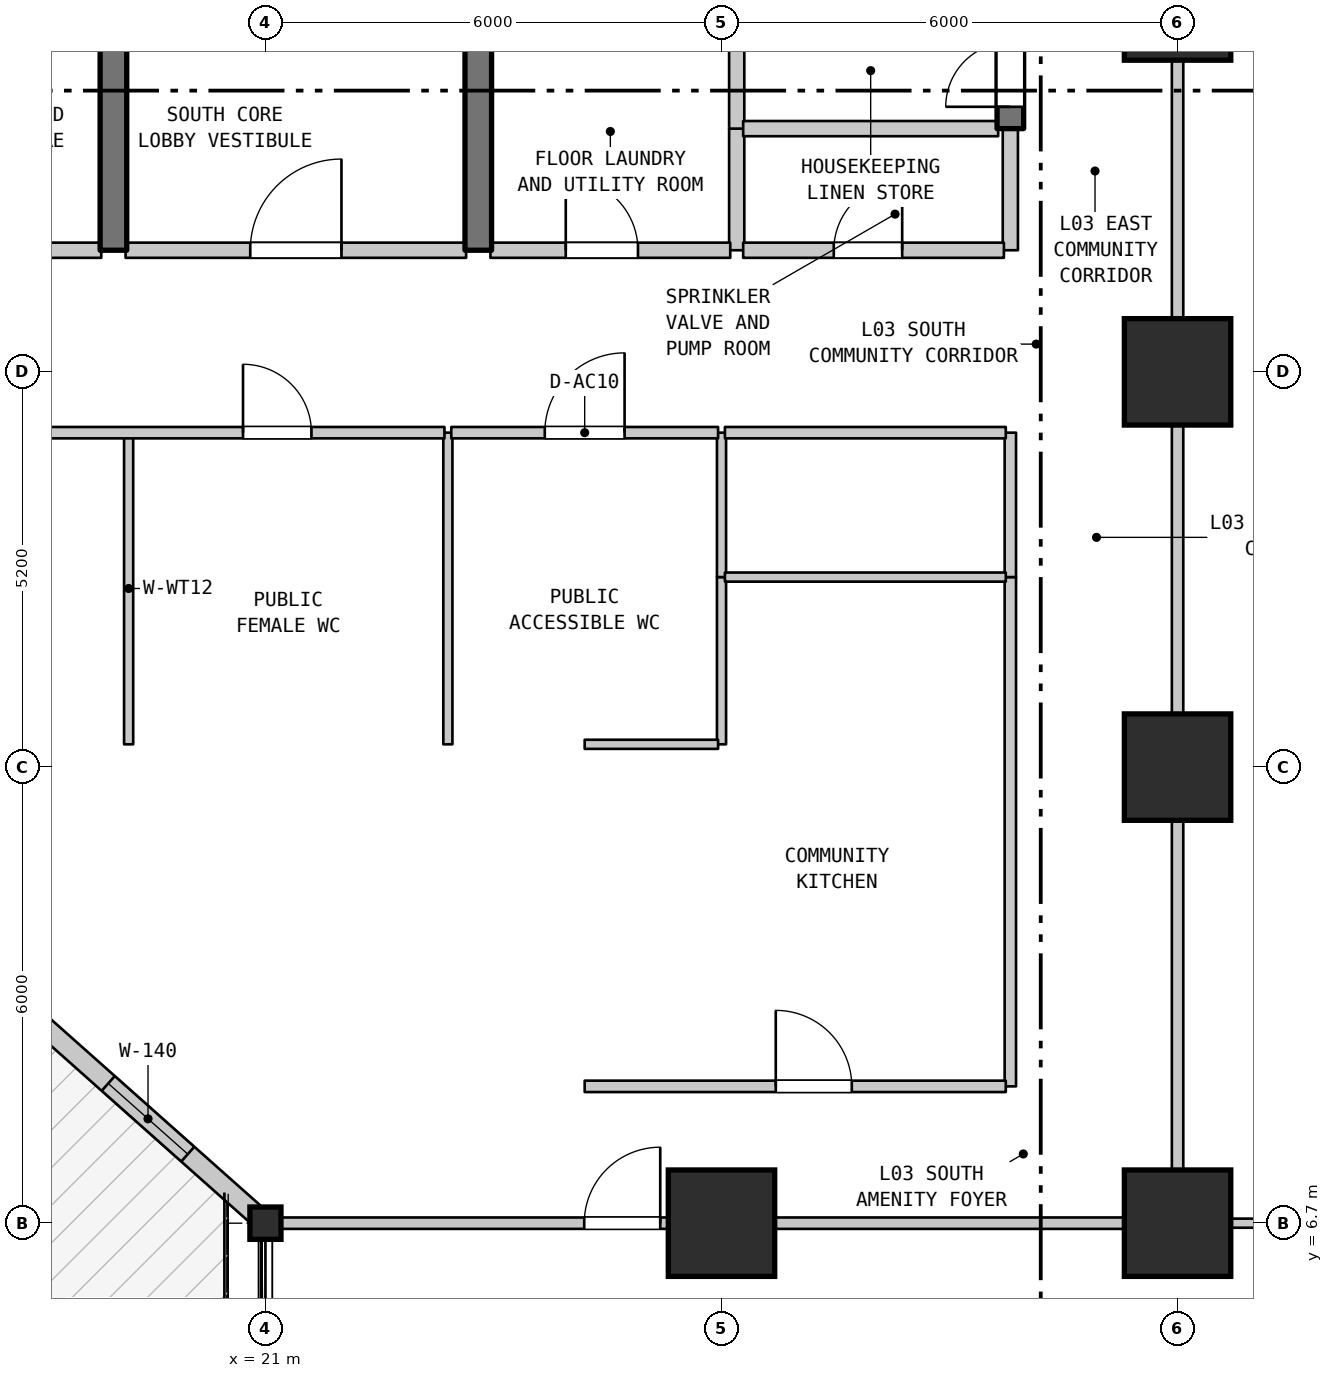
"""IFC4 building model, lengths in metres.
Left out: names, types, materials, properties, quantities, classifications, styles, units other than length and angle.
Written with IfcOpenShell. Run it as: python <this file> out.ifc"""

import sys

from ifc_helpers import new_model, si_unit, direction, frame, frame_2d, origin, origin_2d, place, context, subcontext, project, spatial, rectangle, i_section, extrude, element, fill, save


model = new_model("IFC4")
c1 = context("Model", 3, precision=1e-05, world=origin(), true_north=direction((0.0, 1.0)))
c2 = subcontext(c1, "Body", "Model", "MODEL_VIEW")
j1 = project(units=[si_unit("LENGTHUNIT", "METRE"), si_unit("PLANEANGLEUNIT", "RADIAN")], contexts=[c1])
p1 = place(None, origin())
s1 = spatial("IfcSite", under=j1, at=p1, CompositionType="ELEMENT")
p2 = place(p1, origin())
s2 = spatial("IfcBuilding", under=s1, at=p2, CompositionType="ELEMENT")
p3 = place(p2, frame((0.0, 0.0, 19.0)))
s3 = spatial("IfcBuildingStorey", under=s2, at=p3, CompositionType="ELEMENT", Elevation=19.0)
p4 = place(p3, frame((21.0, 6.7, 0.0), z_axis=(0.0, 0.0, 1.0), x_axis=(1.0, 0.0, 0.0)))
e1 = element("IfcColumn", 1, at=p4, inside=s3, PredefinedType="COLUMN", context=c2, shape_type="SweptSolid", body=[
    extrude(i_section(OverallWidth=0.409, OverallDepth=0.425, WebThickness=0.032, FlangeThickness=0.052, FilletRadius=0.015, at=origin_2d()), origin(), (0.0, 0.0, 1.0), 5.0),
])
for number, where, z_axis, x_axis in (
    (2, (27.0, 6.7, 0.0), (0.0, 0.0, 1.0), (1.0, 0.0, 0.0)),
    (3, (33.0, 6.7, 0.0), (0.0, 0.0, 1.0), (1.0, 0.0, 0.0)),
    (4, (33.0, 12.7, 0.0), (0.0, 0.0, 1.0), (1.0, 0.0, 0.0)),
    (5, (33.0, 17.9, 0.0), (0.0, 0.0, 1.0), (1.0, 0.0, 0.0)),
    (6, (33.0, 22.7, 0.0), (0.0, 0.0, 1.0), (1.0, 0.0, 0.0)),
):
    element("IfcColumn", number, at=place(p3, frame(where, z_axis=z_axis, x_axis=x_axis)), inside=s3, PredefinedType="COLUMN", context=c2, shape_type="SweptSolid", body=[
        extrude(rectangle(XDim=1.4, YDim=1.4, at=origin_2d()), origin(), (0.0, 0.0, 1.0), 5.0),
    ])
p5 = place(p3, frame((21.0, 6.7, 0.0), z_axis=(0.0, 0.0, 1.0), x_axis=(-0.747409318684, 0.66436383883, 0.0)))
e7 = element("IfcWall", 7, at=p5, inside=s3, PredefinedType="STANDARD", context=c2, shape_type="SweptSolid", body=[
    extrude(rectangle(XDim=4.495, YDim=0.26, at=frame_2d((2.248, 0.0))), origin(), (0.0, 0.0, 1.0), 4.285),
])
p6 = place(p5, frame((1.367, 0.0, 0.9)))
e8 = element("IfcOpeningElement", 8, at=p6, cuts=e7, PredefinedType="OPENING", context=c2, shape_type="SweptSolid", body=[
    extrude(rectangle(XDim=1.4, YDim=1.85, at=frame_2d((0.7, 0.925))), frame((0.0, 0.14, 0.0), z_axis=(0.0, -1.0, 0.0), x_axis=(1.0, 0.0, 0.0)), (0.0, 0.0, 1.0), 0.28),
])
p7 = place(p3, frame((19.0, 19.5, 0.0), z_axis=(0.0, 0.0, 1.0), x_axis=(0.0, 1.0, 0.0)))
e9 = element("IfcWall", 9, at=p7, inside=s3, PredefinedType="SHEAR", context=c2, shape_type="SweptSolid", body=[
    extrude(rectangle(XDim=3.2, YDim=0.35, at=frame_2d((1.6, 0.0))), origin(), (0.0, 0.0, 1.0), 4.685),
])
for number, where, z_axis, x_axis in (
    (10, (19.2, 13.0, 0.0), (0.0, 0.0, 1.0), (0.0, 1.0, 0.0)),
    (11, (23.4, 13.0, 0.0), (0.0, 0.0, 1.0), (0.0, 1.0, 0.0)),
):
    element("IfcWall", number, at=place(p3, frame(where, z_axis=z_axis, x_axis=x_axis)), inside=s3, PredefinedType="PARTITIONING", context=c2, shape_type="SweptSolid", body=[
        extrude(rectangle(XDim=4.1, YDim=0.12, at=frame_2d((2.05, 0.0))), origin(), (0.0, 0.0, 1.0), 4.685),
    ])
p8 = place(p3, frame((23.8, 19.5, 0.0), z_axis=(0.0, 0.0, 1.0), x_axis=(0.0, 1.0, 0.0)))
e12 = element("IfcWall", 12, at=p8, inside=s3, PredefinedType="SHEAR", context=c2, shape_type="SweptSolid", body=[
    extrude(rectangle(XDim=3.2, YDim=0.35, at=frame_2d((1.6, 0.0))), origin(), (0.0, 0.0, 1.0), 4.685),
])
p9 = place(p3, frame((27.0, 13.0, 0.0), z_axis=(0.0, 0.0, 1.0), x_axis=(0.0, 1.0, 0.0)))
e13 = element("IfcWall", 13, at=p9, inside=s3, PredefinedType="PARTITIONING", context=c2, shape_type="SweptSolid", body=[
    extrude(rectangle(XDim=2.2, YDim=0.12, at=frame_2d((1.1, 0.0))), origin(), (0.0, 0.0, 1.0), 4.685),
])
p10 = place(p3, frame((27.0, 15.2, 0.0), z_axis=(0.0, 0.0, 1.0), x_axis=(0.0, 1.0, 0.0)))
e14 = element("IfcWall", 14, at=p10, inside=s3, PredefinedType="PARTITIONING", context=c2, shape_type="SweptSolid", body=[
    extrude(rectangle(XDim=1.9, YDim=0.12, at=frame_2d((0.95, 0.0))), origin(), (0.0, 0.0, 1.0), 4.685),
])
p11 = place(p3, frame((27.2, 19.5, 0.0), z_axis=(0.0, 0.0, 1.0), x_axis=(0.0, 1.0, 0.0)))
e15 = element("IfcWall", 15, at=p11, inside=s3, PredefinedType="STANDARD", context=c2, shape_type="SweptSolid", body=[
    extrude(rectangle(XDim=1.6, YDim=0.2, at=frame_2d((0.8, 0.0))), origin(), (0.0, 0.0, 1.0), 4.685),
])
p12 = place(p3, frame((27.2, 21.1, 0.0), z_axis=(0.0, 0.0, 1.0), x_axis=(0.0, 1.0, 0.0)))
e16 = element("IfcWall", 16, at=p12, inside=s3, PredefinedType="STANDARD", context=c2, shape_type="SweptSolid", body=[
    extrude(rectangle(XDim=1.6, YDim=0.2, at=frame_2d((0.8, 0.0))), origin(), (0.0, 0.0, 1.0), 4.685),
])
p13 = place(p3, frame((30.8, 8.5, 0.0), z_axis=(0.0, 0.0, 1.0), x_axis=(0.0, 1.0, 0.0)))
e17 = element("IfcWall", 17, at=p13, inside=s3, PredefinedType="STANDARD", context=c2, shape_type="SweptSolid", body=[
    extrude(rectangle(XDim=6.7, YDim=0.15, at=frame_2d((3.35, 0.0))), origin(), (0.0, 0.0, 1.0), 4.685),
])
p14 = place(p3, frame((30.8, 15.2, 0.0), z_axis=(0.0, 0.0, 1.0), x_axis=(0.0, 1.0, 0.0)))
e18 = element("IfcWall", 18, at=p14, inside=s3, PredefinedType="STANDARD", context=c2, shape_type="SweptSolid", body=[
    extrude(rectangle(XDim=1.9, YDim=0.15, at=frame_2d((0.95, 0.0))), origin(), (0.0, 0.0, 1.0), 4.685),
])
p15 = place(p3, frame((30.8, 19.5, 0.0), z_axis=(0.0, 0.0, 1.0), x_axis=(0.0, 1.0, 0.0)))
e19 = element("IfcWall", 19, at=p15, inside=s3, PredefinedType="STANDARD", context=c2, shape_type="SweptSolid", body=[
    extrude(rectangle(XDim=1.6, YDim=0.2, at=frame_2d((0.8, 0.0))), origin(), (0.0, 0.0, 1.0), 4.685),
])
p16 = place(p3, frame((30.8, 21.1, 0.0), z_axis=(0.0, 0.0, 1.0), x_axis=(0.0, 1.0, 0.0)))
e20 = element("IfcWall", 20, at=p16, inside=s3, PredefinedType="SHEAR", context=c2, shape_type="SweptSolid", body=[
    extrude(rectangle(XDim=1.6, YDim=0.35, at=frame_2d((0.8, 0.0))), origin(), (0.0, 0.0, 1.0), 4.685),
])
p17 = place(p16, frame((0.287, 0.0, 0.0)))
e21 = element("IfcOpeningElement", 21, at=p17, cuts=e20, PredefinedType="OPENING", context=c2, shape_type="SweptSolid", body=[
    extrude(rectangle(XDim=0.85, YDim=2.1, at=frame_2d((0.425, 1.05))), frame((0.0, 0.185, 0.0), z_axis=(0.0, -1.0, 0.0), x_axis=(1.0, 0.0, 0.0)), (0.0, 0.0, 1.0), 0.37),
])
p18 = place(p3, frame((33.0, 6.7, 0.0), z_axis=(0.0, 0.0, 1.0), x_axis=(0.0, 1.0, 0.0)))
e22 = element("IfcWall", 22, at=p18, inside=s3, PredefinedType="STANDARD", context=c2, shape_type="SweptSolid", body=[
    extrude(rectangle(XDim=19.2, YDim=0.15, at=frame_2d((9.6, 0.0))), origin(), (0.0, 0.0, 1.0), 4.185),
])
p19 = place(p3, frame((21.01, 6.7, 0.0), z_axis=(0.0, 0.0, 1.0), x_axis=(1.0, 0.0, 0.0)))
e23 = element("IfcWall", 23, at=p19, inside=s3, PredefinedType="STANDARD", context=c2, shape_type="SweptSolid", body=[
    extrude(rectangle(XDim=11.93, YDim=0.15, at=frame_2d((5.965, 0.0))), origin(), (0.0, 0.0, 1.0), 4.185),
])
p20 = place(p19, frame((4.184, 0.0, 0.0)))
e24 = element("IfcOpeningElement", 24, at=p20, cuts=e23, PredefinedType="OPENING", context=c2, shape_type="SweptSolid", body=[
    extrude(rectangle(XDim=1.0, YDim=2.15, at=frame_2d((0.5, 1.075))), frame((0.0, 0.085, 0.0), z_axis=(0.0, -1.0, 0.0), x_axis=(1.0, 0.0, 0.0)), (0.0, 0.0, 1.0), 0.17),
])
p21 = place(p3, frame((33.06, 6.7, 0.0), z_axis=(0.0, 0.0, 1.0), x_axis=(1.0, 0.0, 0.0)))
e25 = element("IfcWall", 25, at=p21, inside=s3, PredefinedType="PARTITIONING", context=c2, shape_type="SweptSolid", body=[
    extrude(rectangle(XDim=5.94, YDim=0.12, at=frame_2d((2.97, 0.0))), origin(), (0.0, 0.0, 1.0), 4.185),
])
p22 = place(p3, frame((25.2, 8.5, 0.0), z_axis=(0.0, 0.0, 1.0), x_axis=(1.0, 0.0, 0.0)))
e26 = element("IfcWall", 26, at=p22, inside=s3, PredefinedType="STANDARD", context=c2, shape_type="SweptSolid", body=[
    extrude(rectangle(XDim=5.54, YDim=0.15, at=frame_2d((2.77, 0.0))), origin(), (0.0, 0.0, 1.0), 4.685),
])
p23 = place(p22, frame((2.514, 0.0, 0.0)))
e27 = element("IfcOpeningElement", 27, at=p23, cuts=e26, PredefinedType="OPENING", context=c2, shape_type="SweptSolid", body=[
    extrude(rectangle(XDim=1.0, YDim=2.15, at=frame_2d((0.5, 1.075))), frame((0.0, 0.085, 0.0), z_axis=(0.0, -1.0, 0.0), x_axis=(1.0, 0.0, 0.0)), (0.0, 0.0, 1.0), 0.17),
])
p24 = place(p3, frame((25.2, 13.0, 0.0), z_axis=(0.0, 0.0, 1.0), x_axis=(1.0, 0.0, 0.0)))
e28 = element("IfcWall", 28, at=p24, inside=s3, PredefinedType="PARTITIONING", context=c2, shape_type="SweptSolid", body=[
    extrude(rectangle(XDim=1.755, YDim=0.12, at=frame_2d((0.877, 0.0))), origin(), (0.0, 0.0, 1.0), 4.685),
])
p25 = place(p3, frame((27.045, 15.2, 0.0), z_axis=(0.0, 0.0, 1.0), x_axis=(1.0, 0.0, 0.0)))
e29 = element("IfcWall", 29, at=p25, inside=s3, PredefinedType="PARTITIONING", context=c2, shape_type="SweptSolid", body=[
    extrude(rectangle(XDim=3.695, YDim=0.12, at=frame_2d((1.848, 0.0))), origin(), (0.0, 0.0, 1.0), 4.685),
])
p26 = place(p3, frame((15.06, 17.1, 0.0), z_axis=(0.0, 0.0, 1.0), x_axis=(1.0, 0.0, 0.0)))
e30 = element("IfcWall", 30, at=p26, inside=s3, PredefinedType="STANDARD", context=c2, shape_type="SweptSolid", body=[
    extrude(rectangle(XDim=8.295, YDim=0.15, at=frame_2d((4.147, 0.0))), origin(), (0.0, 0.0, 1.0), 4.685),
])
p27 = place(p26, frame((1.595, 0.0, 0.0)))
e31 = element("IfcOpeningElement", 31, at=p27, cuts=e30, PredefinedType="OPENING", context=c2, shape_type="SweptSolid", body=[
    extrude(rectangle(XDim=0.9, YDim=2.1, at=frame_2d((0.45, 1.05))), frame((0.0, 0.085, 0.0), z_axis=(0.0, -1.0, 0.0), x_axis=(1.0, 0.0, 0.0)), (0.0, 0.0, 1.0), 0.17),
])
p28 = place(p26, frame((5.645, 0.0, 0.0)))
e32 = element("IfcOpeningElement", 32, at=p28, cuts=e30, PredefinedType="OPENING", context=c2, shape_type="SweptSolid", body=[
    extrude(rectangle(XDim=0.9, YDim=2.1, at=frame_2d((0.45, 1.05))), frame((0.0, 0.085, 0.0), z_axis=(0.0, -1.0, 0.0), x_axis=(1.0, 0.0, 0.0)), (0.0, 0.0, 1.0), 0.17),
])
p29 = place(p3, frame((23.445, 17.1, 0.0), z_axis=(0.0, 0.0, 1.0), x_axis=(1.0, 0.0, 0.0)))
e33 = element("IfcWall", 33, at=p29, inside=s3, PredefinedType="STANDARD", context=c2, shape_type="SweptSolid", body=[
    extrude(rectangle(XDim=3.51, YDim=0.15, at=frame_2d((1.755, 0.0))), origin(), (0.0, 0.0, 1.0), 4.685),
])
p30 = place(p29, frame((1.23, 0.0, 0.0)))
e34 = element("IfcOpeningElement", 34, at=p30, cuts=e33, PredefinedType="OPENING", context=c2, shape_type="SweptSolid", body=[
    extrude(rectangle(XDim=1.05, YDim=2.15, at=frame_2d((0.525, 1.075))), frame((0.0, 0.085, 0.0), z_axis=(0.0, -1.0, 0.0), x_axis=(1.0, 0.0, 0.0)), (0.0, 0.0, 1.0), 0.17),
])
p31 = place(p3, frame((27.045, 17.1, 0.0), z_axis=(0.0, 0.0, 1.0), x_axis=(1.0, 0.0, 0.0)))
e35 = element("IfcWall", 35, at=p31, inside=s3, PredefinedType="STANDARD", context=c2, shape_type="SweptSolid", body=[
    extrude(rectangle(XDim=3.695, YDim=0.15, at=frame_2d((1.848, 0.0))), origin(), (0.0, 0.0, 1.0), 4.685),
])
p32 = place(p3, frame((15.16, 19.5, 0.0), z_axis=(0.0, 0.0, 1.0), x_axis=(1.0, 0.0, 0.0)))
e36 = element("IfcWall", 36, at=p32, inside=s3, PredefinedType="STANDARD", context=c2, shape_type="SweptSolid", body=[
    extrude(rectangle(XDim=3.68, YDim=0.2, at=frame_2d((1.84, 0.0))), origin(), (0.0, 0.0, 1.0), 4.685),
])
p33 = place(p32, frame((1.39, 0.0, 0.0)))
e37 = element("IfcOpeningElement", 37, at=p33, cuts=e36, PredefinedType="OPENING", context=c2, shape_type="SweptSolid", body=[
    extrude(rectangle(XDim=0.9, YDim=2.15, at=frame_2d((0.45, 1.075))), frame((0.0, 0.11, 0.0), z_axis=(0.0, -1.0, 0.0), x_axis=(1.0, 0.0, 0.0)), (0.0, 0.0, 1.0), 0.22),
])
p34 = place(p3, frame((19.16, 19.5, 0.0), z_axis=(0.0, 0.0, 1.0), x_axis=(1.0, 0.0, 0.0)))
e38 = element("IfcWall", 38, at=p34, inside=s3, PredefinedType="STANDARD", context=c2, shape_type="SweptSolid", body=[
    extrude(rectangle(XDim=4.48, YDim=0.2, at=frame_2d((2.24, 0.0))), origin(), (0.0, 0.0, 1.0), 4.685),
])
p35 = place(p34, frame((1.64, 0.0, 0.0)))
e39 = element("IfcOpeningElement", 39, at=p35, cuts=e38, PredefinedType="OPENING", context=c2, shape_type="SweptSolid", body=[
    extrude(rectangle(XDim=1.2, YDim=2.2, at=frame_2d((0.6, 1.1))), frame((0.0, 0.11, 0.0), z_axis=(0.0, -1.0, 0.0), x_axis=(1.0, 0.0, 0.0)), (0.0, 0.0, 1.0), 0.22),
])
p36 = place(p3, frame((23.96, 19.5, 0.0), z_axis=(0.0, 0.0, 1.0), x_axis=(1.0, 0.0, 0.0)))
e40 = element("IfcWall", 40, at=p36, inside=s3, PredefinedType="STANDARD", context=c2, shape_type="SweptSolid", body=[
    extrude(rectangle(XDim=3.155, YDim=0.2, at=frame_2d((1.578, 0.0))), origin(), (0.0, 0.0, 1.0), 4.685),
])
p37 = place(p36, frame((0.991, 0.0, 0.0)))
e41 = element("IfcOpeningElement", 41, at=p37, cuts=e40, PredefinedType="OPENING", context=c2, shape_type="SweptSolid", body=[
    extrude(rectangle(XDim=0.95, YDim=2.15, at=frame_2d((0.475, 1.075))), frame((0.0, 0.11, 0.0), z_axis=(0.0, -1.0, 0.0), x_axis=(1.0, 0.0, 0.0)), (0.0, 0.0, 1.0), 0.22),
])
p38 = place(p3, frame((27.285, 19.5, 0.0), z_axis=(0.0, 0.0, 1.0), x_axis=(1.0, 0.0, 0.0)))
e42 = element("IfcWall", 42, at=p38, inside=s3, PredefinedType="STANDARD", context=c2, shape_type="SweptSolid", body=[
    extrude(rectangle(XDim=3.43, YDim=0.2, at=frame_2d((1.715, 0.0))), origin(), (0.0, 0.0, 1.0), 4.685),
])
p39 = place(p38, frame((1.192, 0.0, 0.0)))
e43 = element("IfcOpeningElement", 43, at=p39, cuts=e42, PredefinedType="OPENING", context=c2, shape_type="SweptSolid", body=[
    extrude(rectangle(XDim=0.9, YDim=2.15, at=frame_2d((0.45, 1.075))), frame((0.0, 0.11, 0.0), z_axis=(0.0, -1.0, 0.0), x_axis=(1.0, 0.0, 0.0)), (0.0, 0.0, 1.0), 0.22),
])
p40 = place(p3, frame((27.285, 21.1, 0.0), z_axis=(0.0, 0.0, 1.0), x_axis=(1.0, 0.0, 0.0)))
e44 = element("IfcWall", 44, at=p40, inside=s3, PredefinedType="STANDARD", context=c2, shape_type="SweptSolid", body=[
    extrude(rectangle(XDim=3.355, YDim=0.2, at=frame_2d((1.677, 0.0))), origin(), (0.0, 0.0, 1.0), 4.685),
])
p41 = place(p6, origin())
e45 = element("IfcWindow", 45, at=p41, inside=s3, PartitioningType="SINGLE_PANEL", PredefinedType="WINDOW", context=c2, shape_type="SweptSolid", body=[
    extrude(rectangle(XDim=1.4, YDim=1.85, at=frame_2d((0.7, 0.925))), frame((0.0, 0.03, 0.0), z_axis=(0.0, -1.0, 0.0), x_axis=(1.0, 0.0, 0.0)), (0.0, 0.0, 1.0), 0.06),
])
fill(e8, e45)
p42 = place(p17, origin())
e46 = element("IfcDoor", 46, at=p42, inside=s3, OperationType="SINGLE_SWING_LEFT", PredefinedType="DOOR", context=c2, shape_type="SweptSolid", body=[
    extrude(rectangle(XDim=0.85, YDim=2.1, at=frame_2d((0.425, 1.05))), frame((0.0, 0.025, 0.0), z_axis=(0.0, -1.0, 0.0), x_axis=(1.0, 0.0, 0.0)), (0.0, 0.0, 1.0), 0.05),
])
fill(e21, e46)
p43 = place(p20, origin())
e47 = element("IfcDoor", 47, at=p43, inside=s3, OperationType="SINGLE_SWING_RIGHT", PredefinedType="DOOR", context=c2, shape_type="SweptSolid", body=[
    extrude(rectangle(XDim=1.0, YDim=2.15, at=frame_2d((0.5, 1.075))), frame((0.0, 0.025, 0.0), z_axis=(0.0, -1.0, 0.0), x_axis=(1.0, 0.0, 0.0)), (0.0, 0.0, 1.0), 0.05),
])
fill(e24, e47)
p44 = place(p23, origin())
e48 = element("IfcDoor", 48, at=p44, inside=s3, OperationType="SINGLE_SWING_LEFT", PredefinedType="DOOR", context=c2, shape_type="SweptSolid", body=[
    extrude(rectangle(XDim=1.0, YDim=2.15, at=frame_2d((0.5, 1.075))), frame((0.0, 0.025, 0.0), z_axis=(0.0, -1.0, 0.0), x_axis=(1.0, 0.0, 0.0)), (0.0, 0.0, 1.0), 0.05),
])
fill(e27, e48)
p45 = place(p28, origin())
e49 = element("IfcDoor", 49, at=p45, inside=s3, OperationType="SINGLE_SWING_LEFT", PredefinedType="DOOR", context=c2, shape_type="SweptSolid", body=[
    extrude(rectangle(XDim=0.9, YDim=2.1, at=frame_2d((0.45, 1.05))), frame((0.0, 0.025, 0.0), z_axis=(0.0, -1.0, 0.0), x_axis=(1.0, 0.0, 0.0)), (0.0, 0.0, 1.0), 0.05),
])
fill(e32, e49)
p46 = place(p30, origin())
e50 = element("IfcDoor", 50, at=p46, inside=s3, OperationType="SINGLE_SWING_RIGHT", PredefinedType="DOOR", context=c2, shape_type="SweptSolid", body=[
    extrude(rectangle(XDim=1.05, YDim=2.15, at=frame_2d((0.525, 1.075))), frame((0.0, 0.025, 0.0), z_axis=(0.0, -1.0, 0.0), x_axis=(1.0, 0.0, 0.0)), (0.0, 0.0, 1.0), 0.05),
])
fill(e34, e50)
p47 = place(p35, origin())
e51 = element("IfcDoor", 51, at=p47, inside=s3, OperationType="SINGLE_SWING_RIGHT", PredefinedType="DOOR", context=c2, shape_type="SweptSolid", body=[
    extrude(rectangle(XDim=1.2, YDim=2.2, at=frame_2d((0.6, 1.1))), frame((0.0, 0.025, 0.0), z_axis=(0.0, -1.0, 0.0), x_axis=(1.0, 0.0, 0.0)), (0.0, 0.0, 1.0), 0.05),
])
fill(e39, e51)
p48 = place(p37, origin())
e52 = element("IfcDoor", 52, at=p48, inside=s3, OperationType="SINGLE_SWING_LEFT", PredefinedType="DOOR", context=c2, shape_type="SweptSolid", body=[
    extrude(rectangle(XDim=0.95, YDim=2.15, at=frame_2d((0.475, 1.075))), frame((0.0, 0.025, 0.0), z_axis=(0.0, -1.0, 0.0), x_axis=(1.0, 0.0, 0.0)), (0.0, 0.0, 1.0), 0.05),
])
fill(e41, e52)
p49 = place(p39, origin())
e53 = element("IfcDoor", 53, at=p49, inside=s3, OperationType="SINGLE_SWING_RIGHT", PredefinedType="DOOR", context=c2, shape_type="SweptSolid", body=[
    extrude(rectangle(XDim=0.9, YDim=2.15, at=frame_2d((0.45, 1.075))), frame((0.0, 0.025, 0.0), z_axis=(0.0, -1.0, 0.0), x_axis=(1.0, 0.0, 0.0)), (0.0, 0.0, 1.0), 0.05),
])
fill(e43, e53)
save(model, sys.argv[1])
